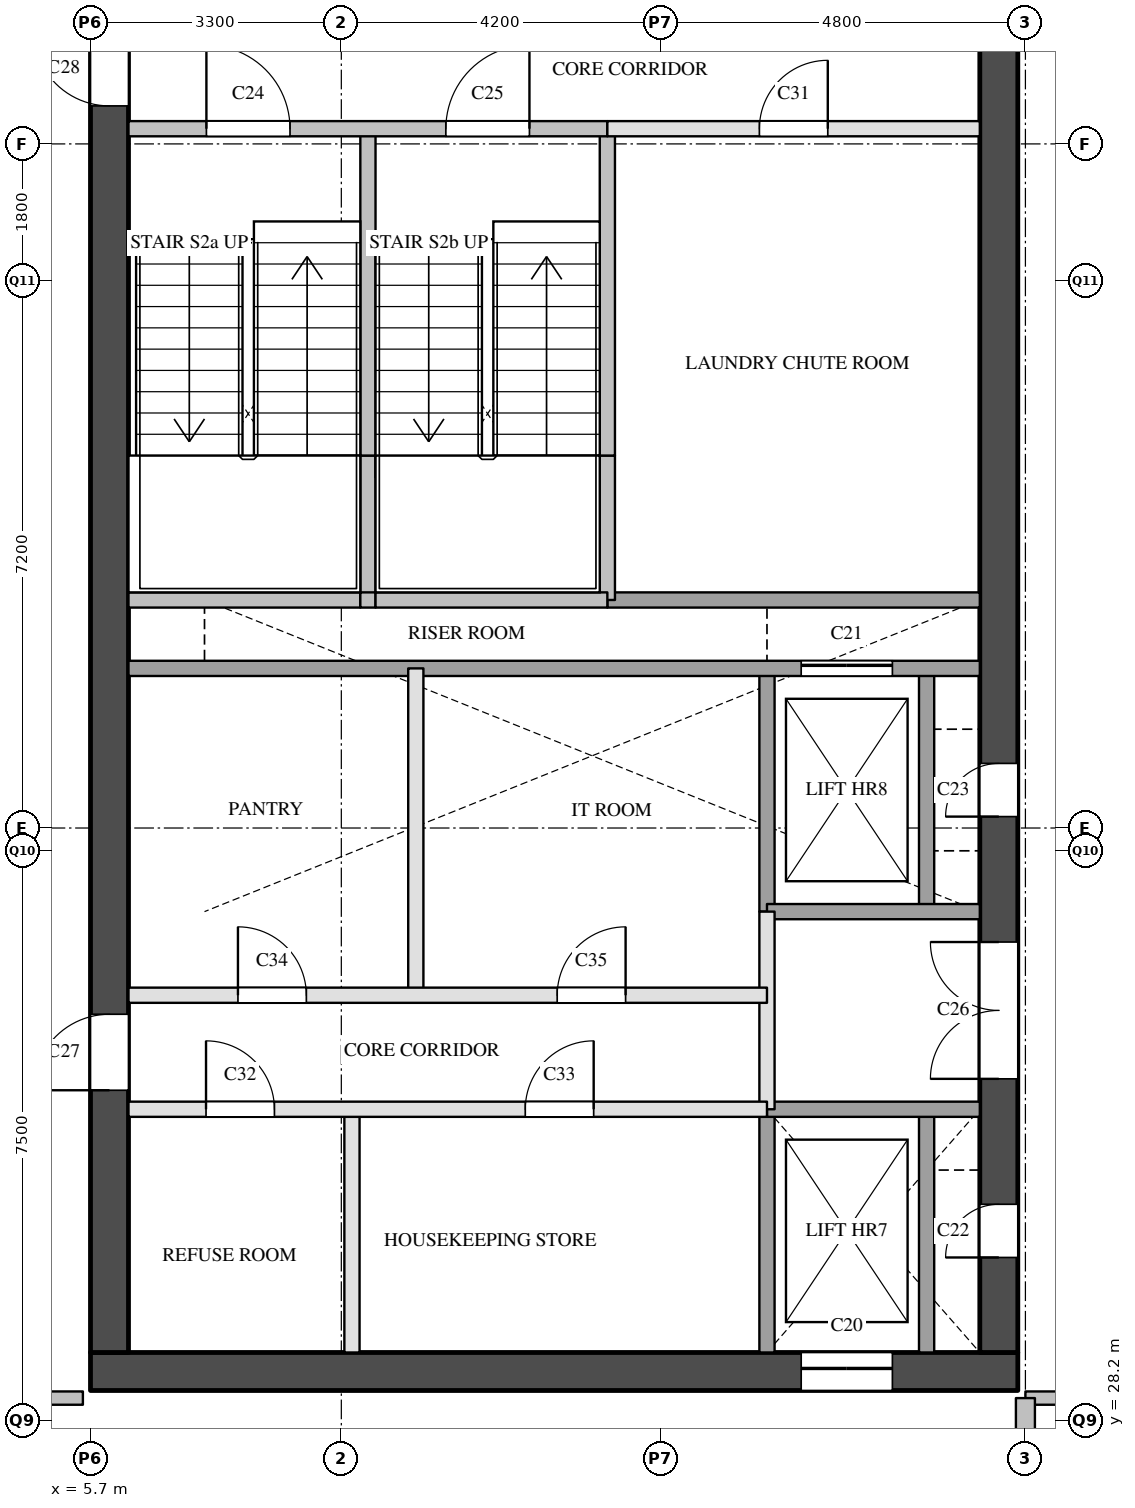
"""IFC4 building model, lengths in metres.
Left out: names, types, materials, properties, quantities, classifications, styles, units other than length and angle.
Written with IfcOpenShell. Run it as: python <this file> out.ifc"""

import sys

from ifc_helpers import new_model, si_unit, direction, frame, frame_2d, origin, place, context, subcontext, project, spatial, rectangle, extrude, element, fill, save


model = new_model("IFC4")
c1 = context("Model", 3, precision=1e-05, world=origin(), true_north=direction((0.0, 1.0)))
c2 = subcontext(c1, "Body", "Model", "MODEL_VIEW")
j1 = project(units=[si_unit("LENGTHUNIT", "METRE"), si_unit("PLANEANGLEUNIT", "RADIAN")], contexts=[c1])
p1 = place(None, origin())
s1 = spatial("IfcSite", under=j1, at=p1, CompositionType="ELEMENT")
p2 = place(p1, origin())
s2 = spatial("IfcBuilding", under=s1, at=p2, CompositionType="ELEMENT")
p3 = place(p2, frame((0.0, 0.0, 185.6)))
s3 = spatial("IfcBuildingStorey", under=s2, at=p3, CompositionType="ELEMENT", Elevation=185.6)
p4 = place(p3, frame((5.7, 28.85, 0.0), z_axis=(0.0, 0.0, 1.0), x_axis=(1.0, 0.0, 0.0)))
e1 = element("IfcWall", 1, at=p4, inside=s3, PredefinedType="SHEAR", context=c2, shape_type="SweptSolid", body=[
    extrude(rectangle(XDim=12.2, YDim=0.5, at=frame_2d((6.1, 0.0))), origin(), (0.0, 0.0, 1.0), 3.6),
])
p5 = place(p4, frame((9.35, 0.0, 0.0)))
e2 = element("IfcOpeningElement", 2, at=p5, cuts=e1, PredefinedType="OPENING", context=c2, shape_type="SweptSolid", body=[
    extrude(rectangle(XDim=1.2, YDim=2.1, at=frame_2d((0.6, 1.05))), frame((0.0, 0.26, 0.0), z_axis=(0.0, -1.0, 0.0), x_axis=(1.0, 0.0, 0.0)), (0.0, 0.0, 1.0), 0.52),
])
p6 = place(p3, frame((5.95, 29.1, 0.0), z_axis=(0.0, 0.0, 1.0), x_axis=(0.0, 1.0, 0.0)))
e3 = element("IfcWall", 3, at=p6, inside=s3, PredefinedType="SHEAR", context=c2, shape_type="SweptSolid", body=[
    extrude(rectangle(XDim=20.3, YDim=0.5, at=frame_2d((10.15, 0.0))), origin(), (0.0, 0.0, 1.0), 3.6),
])
p7 = place(p6, frame((3.45, 0.0, 0.0)))
e4 = element("IfcOpeningElement", 4, at=p7, cuts=e3, PredefinedType="OPENING", context=c2, shape_type="SweptSolid", body=[
    extrude(rectangle(XDim=1.0, YDim=2.1, at=frame_2d((0.5, 1.05))), frame((0.0, 0.26, 0.0), z_axis=(0.0, -1.0, 0.0), x_axis=(1.0, 0.0, 0.0)), (0.0, 0.0, 1.0), 0.52),
])
p8 = place(p6, frame((16.4, 0.0, 0.0)))
e5 = element("IfcOpeningElement", 5, at=p8, cuts=e3, PredefinedType="OPENING", context=c2, shape_type="SweptSolid", body=[
    extrude(rectangle(XDim=1.0, YDim=2.1, at=frame_2d((0.5, 1.05))), frame((0.0, 0.26, 0.0), z_axis=(0.0, -1.0, 0.0), x_axis=(1.0, 0.0, 0.0)), (0.0, 0.0, 1.0), 0.52),
])
p9 = place(p3, frame((17.65, 29.1, 0.0), z_axis=(0.0, 0.0, 1.0), x_axis=(0.0, 1.0, 0.0)))
e6 = element("IfcWall", 6, at=p9, inside=s3, PredefinedType="SHEAR", context=c2, shape_type="SweptSolid", body=[
    extrude(rectangle(XDim=20.3, YDim=0.5, at=frame_2d((10.15, 0.0))), origin(), (0.0, 0.0, 1.0), 3.6),
])
p10 = place(p9, frame((1.25, 0.0, 0.0)))
e7 = element("IfcOpeningElement", 7, at=p10, cuts=e6, PredefinedType="OPENING", context=c2, shape_type="SweptSolid", body=[
    extrude(rectangle(XDim=0.7, YDim=2.1, at=frame_2d((0.35, 1.05))), frame((0.0, 0.26, 0.0), z_axis=(0.0, -1.0, 0.0), x_axis=(1.0, 0.0, 0.0)), (0.0, 0.0, 1.0), 0.52),
])
p11 = place(p9, frame((7.05, 0.0, 0.0)))
e8 = element("IfcOpeningElement", 8, at=p11, cuts=e6, PredefinedType="OPENING", context=c2, shape_type="SweptSolid", body=[
    extrude(rectangle(XDim=0.7, YDim=2.1, at=frame_2d((0.35, 1.05))), frame((0.0, 0.26, 0.0), z_axis=(0.0, -1.0, 0.0), x_axis=(1.0, 0.0, 0.0)), (0.0, 0.0, 1.0), 0.52),
])
p12 = place(p9, frame((3.6, 0.0, 0.0)))
e9 = element("IfcOpeningElement", 9, at=p12, cuts=e6, PredefinedType="OPENING", context=c2, shape_type="SweptSolid", body=[
    extrude(rectangle(XDim=1.8, YDim=2.1, at=frame_2d((0.9, 1.05))), frame((0.0, 0.26, 0.0), z_axis=(0.0, -1.0, 0.0), x_axis=(1.0, 0.0, 0.0)), (0.0, 0.0, 1.0), 0.52),
])
p13 = place(p3, frame((9.14, 29.1, 0.0), z_axis=(0.0, 0.0, 1.0), x_axis=(0.0, 1.0, 0.0)))
e10 = element("IfcWall", 10, at=p13, inside=s3, PredefinedType="PARTITIONING", context=c2, shape_type="SweptSolid", body=[
    extrude(rectangle(XDim=3.2, YDim=0.2, at=frame_2d((1.6, 0.0))), origin(), (0.0, 0.0, 1.0), 3.6),
])
p14 = place(p3, frame((9.35, 39.0, 0.0), z_axis=(0.0, 0.0, 1.0), x_axis=(0.0, 1.0, 0.0)))
e11 = element("IfcWall", 11, at=p14, inside=s3, PredefinedType="SOLIDWALL", context=c2, shape_type="SweptSolid", body=[
    extrude(rectangle(XDim=1.9, YDim=0.2, at=frame_2d((0.95, 0.0))), origin(), (0.0, 0.0, 1.0), 3.6),
])
p15 = place(p3, frame((9.35, 40.9, 0.0), z_axis=(0.0, 0.0, 1.0), x_axis=(0.0, 1.0, 0.0)))
e12 = element("IfcWall", 12, at=p15, inside=s3, PredefinedType="SOLIDWALL", context=c2, shape_type="SweptSolid", body=[
    extrude(rectangle(XDim=4.3, YDim=0.2, at=frame_2d((2.15, 0.0))), origin(), (0.0, 0.0, 1.0), 3.6),
])
p16 = place(p3, frame((9.98, 33.8, 0.0), z_axis=(0.0, 0.0, 1.0), x_axis=(0.0, 1.0, 0.0)))
e13 = element("IfcWall", 13, at=p16, inside=s3, PredefinedType="PARTITIONING", context=c2, shape_type="SweptSolid", body=[
    extrude(rectangle(XDim=4.3, YDim=0.2, at=frame_2d((2.15, 0.0))), origin(), (0.0, 0.0, 1.0), 3.6),
])
p17 = place(p3, frame((12.5, 39.0, 0.0), z_axis=(0.0, 0.0, 1.0), x_axis=(0.0, 1.0, 0.0)))
e14 = element("IfcWall", 14, at=p17, inside=s3, PredefinedType="SOLIDWALL", context=c2, shape_type="SweptSolid", body=[
    extrude(rectangle(XDim=1.9, YDim=0.2, at=frame_2d((0.95, 0.0))), origin(), (0.0, 0.0, 1.0), 3.6),
])
p18 = place(p3, frame((12.5, 40.9, 0.0), z_axis=(0.0, 0.0, 1.0), x_axis=(0.0, 1.0, 0.0)))
e15 = element("IfcWall", 15, at=p18, inside=s3, PredefinedType="SOLIDWALL", context=c2, shape_type="SweptSolid", body=[
    extrude(rectangle(XDim=4.3, YDim=0.2, at=frame_2d((2.15, 0.0))), origin(), (0.0, 0.0, 1.0), 3.6),
])
p19 = place(p3, frame((14.6, 32.3, 0.0), z_axis=(0.0, 0.0, 1.0), x_axis=(0.0, 1.0, 0.0)))
e16 = element("IfcWall", 16, at=p19, inside=s3, PredefinedType="PARTITIONING", context=c2, shape_type="SweptSolid", body=[
    extrude(rectangle(XDim=2.6, YDim=0.2, at=frame_2d((1.3, 0.0))), origin(), (0.0, 0.0, 1.0), 3.6),
])
p20 = place(p3, frame((14.6, 29.1, 0.0), z_axis=(0.0, 0.0, 1.0), x_axis=(0.0, 1.0, 0.0)))
e17 = element("IfcWall", 17, at=p20, inside=s3, PredefinedType="SOLIDWALL", context=c2, shape_type="SweptSolid", body=[
    extrude(rectangle(XDim=3.2, YDim=0.2, at=frame_2d((1.6, 0.0))), origin(), (0.0, 0.0, 1.0), 3.6),
])
p21 = place(p3, frame((14.6, 34.9, 0.0), z_axis=(0.0, 0.0, 1.0), x_axis=(0.0, 1.0, 0.0)))
e18 = element("IfcWall", 18, at=p21, inside=s3, PredefinedType="SOLIDWALL", context=c2, shape_type="SweptSolid", body=[
    extrude(rectangle(XDim=3.2, YDim=0.2, at=frame_2d((1.6, 0.0))), origin(), (0.0, 0.0, 1.0), 3.6),
])
p22 = place(p3, frame((16.7, 29.1, 0.0), z_axis=(0.0, 0.0, 1.0), x_axis=(0.0, 1.0, 0.0)))
e19 = element("IfcWall", 19, at=p22, inside=s3, PredefinedType="SOLIDWALL", context=c2, shape_type="SweptSolid", body=[
    extrude(rectangle(XDim=3.2, YDim=0.2, at=frame_2d((1.6, 0.0))), origin(), (0.0, 0.0, 1.0), 3.6),
])
p23 = place(p3, frame((16.7, 34.9, 0.0), z_axis=(0.0, 0.0, 1.0), x_axis=(0.0, 1.0, 0.0)))
e20 = element("IfcWall", 20, at=p23, inside=s3, PredefinedType="SOLIDWALL", context=c2, shape_type="SweptSolid", body=[
    extrude(rectangle(XDim=3.2, YDim=0.2, at=frame_2d((1.6, 0.0))), origin(), (0.0, 0.0, 1.0), 3.6),
])
p24 = place(p3, frame((6.2, 32.3, 0.0), z_axis=(0.0, 0.0, 1.0), x_axis=(1.0, 0.0, 0.0)))
e21 = element("IfcWall", 21, at=p24, inside=s3, PredefinedType="PARTITIONING", context=c2, shape_type="SweptSolid", body=[
    extrude(rectangle(XDim=8.4, YDim=0.2, at=frame_2d((4.2, 0.0))), origin(), (0.0, 0.0, 1.0), 3.6),
])
p25 = place(p24, frame((1.02, 0.0, 0.0)))
e22 = element("IfcOpeningElement", 22, at=p25, cuts=e21, PredefinedType="OPENING", context=c2, shape_type="SweptSolid", body=[
    extrude(rectangle(XDim=0.9, YDim=2.1, at=frame_2d((0.45, 1.05))), frame((0.0, 0.11, 0.0), z_axis=(0.0, -1.0, 0.0), x_axis=(1.0, 0.0, 0.0)), (0.0, 0.0, 1.0), 0.22),
])
p26 = place(p24, frame((5.22, 0.0, 0.0)))
e23 = element("IfcOpeningElement", 23, at=p26, cuts=e21, PredefinedType="OPENING", context=c2, shape_type="SweptSolid", body=[
    extrude(rectangle(XDim=0.9, YDim=2.1, at=frame_2d((0.45, 1.05))), frame((0.0, 0.11, 0.0), z_axis=(0.0, -1.0, 0.0), x_axis=(1.0, 0.0, 0.0)), (0.0, 0.0, 1.0), 0.22),
])
p27 = place(p3, frame((14.6, 32.3, 0.0), z_axis=(0.0, 0.0, 1.0), x_axis=(1.0, 0.0, 0.0)))
e24 = element("IfcWall", 24, at=p27, inside=s3, PredefinedType="SOLIDWALL", context=c2, shape_type="SweptSolid", body=[
    extrude(rectangle(XDim=2.8, YDim=0.2, at=frame_2d((1.4, 0.0))), origin(), (0.0, 0.0, 1.0), 3.6),
])
p28 = place(p3, frame((6.2, 33.8, 0.0), z_axis=(0.0, 0.0, 1.0), x_axis=(1.0, 0.0, 0.0)))
e25 = element("IfcWall", 25, at=p28, inside=s3, PredefinedType="PARTITIONING", context=c2, shape_type="SweptSolid", body=[
    extrude(rectangle(XDim=8.4, YDim=0.2, at=frame_2d((4.2, 0.0))), origin(), (0.0, 0.0, 1.0), 3.6),
])
p29 = place(p28, frame((1.44, 0.0, 0.0)))
e26 = element("IfcOpeningElement", 26, at=p29, cuts=e25, PredefinedType="OPENING", context=c2, shape_type="SweptSolid", body=[
    extrude(rectangle(XDim=0.9, YDim=2.1, at=frame_2d((0.45, 1.05))), frame((0.0, 0.11, 0.0), z_axis=(0.0, -1.0, 0.0), x_axis=(1.0, 0.0, 0.0)), (0.0, 0.0, 1.0), 0.22),
])
p30 = place(p28, frame((5.64, 0.0, 0.0)))
e27 = element("IfcOpeningElement", 27, at=p30, cuts=e25, PredefinedType="OPENING", context=c2, shape_type="SweptSolid", body=[
    extrude(rectangle(XDim=0.9, YDim=2.1, at=frame_2d((0.45, 1.05))), frame((0.0, 0.11, 0.0), z_axis=(0.0, -1.0, 0.0), x_axis=(1.0, 0.0, 0.0)), (0.0, 0.0, 1.0), 0.22),
])
p31 = place(p3, frame((14.6, 34.9, 0.0), z_axis=(0.0, 0.0, 1.0), x_axis=(1.0, 0.0, 0.0)))
e28 = element("IfcWall", 28, at=p31, inside=s3, PredefinedType="SOLIDWALL", context=c2, shape_type="SweptSolid", body=[
    extrude(rectangle(XDim=2.8, YDim=0.2, at=frame_2d((1.4, 0.0))), origin(), (0.0, 0.0, 1.0), 3.6),
])
p32 = place(p3, frame((6.2, 38.1, 0.0), z_axis=(0.0, 0.0, 1.0), x_axis=(1.0, 0.0, 0.0)))
e29 = element("IfcWall", 29, at=p32, inside=s3, PredefinedType="SOLIDWALL", context=c2, shape_type="SweptSolid", body=[
    extrude(rectangle(XDim=11.2, YDim=0.2, at=frame_2d((5.6, 0.0))), origin(), (0.0, 0.0, 1.0), 3.6),
])
p33 = place(p32, frame((8.85, 0.0, 0.0)))
e30 = element("IfcOpeningElement", 30, at=p33, cuts=e29, PredefinedType="OPENING", context=c2, shape_type="SweptSolid", body=[
    extrude(rectangle(XDim=1.2, YDim=2.1, at=frame_2d((0.6, 1.05))), frame((0.0, 0.11, 0.0), z_axis=(0.0, -1.0, 0.0), x_axis=(1.0, 0.0, 0.0)), (0.0, 0.0, 1.0), 0.22),
])
p34 = place(p3, frame((12.5, 39.0, 0.0), z_axis=(0.0, 0.0, 1.0), x_axis=(1.0, 0.0, 0.0)))
e31 = element("IfcWall", 31, at=p34, inside=s3, PredefinedType="SOLIDWALL", context=c2, shape_type="SweptSolid", body=[
    extrude(rectangle(XDim=4.9, YDim=0.2, at=frame_2d((2.45, 0.0))), origin(), (0.0, 0.0, 1.0), 3.6),
])
p35 = place(p3, frame((6.2, 39.0, 0.0), z_axis=(0.0, 0.0, 1.0), x_axis=(1.0, 0.0, 0.0)))
e32 = element("IfcWall", 32, at=p35, inside=s3, PredefinedType="SOLIDWALL", context=c2, shape_type="SweptSolid", body=[
    extrude(rectangle(XDim=3.05, YDim=0.2, at=frame_2d((1.525, 0.0))), origin(), (0.0, 0.0, 1.0), 3.6),
])
p36 = place(p3, frame((9.25, 39.0, 0.0), z_axis=(0.0, 0.0, 1.0), x_axis=(1.0, 0.0, 0.0)))
e33 = element("IfcWall", 33, at=p36, inside=s3, PredefinedType="SOLIDWALL", context=c2, shape_type="SweptSolid", body=[
    extrude(rectangle(XDim=0.2, YDim=0.2, at=frame_2d((0.1, 0.0))), origin(), (0.0, 0.0, 1.0), 3.6),
])
p37 = place(p3, frame((9.45, 39.0, 0.0), z_axis=(0.0, 0.0, 1.0), x_axis=(1.0, 0.0, 0.0)))
e34 = element("IfcWall", 34, at=p37, inside=s3, PredefinedType="SOLIDWALL", context=c2, shape_type="SweptSolid", body=[
    extrude(rectangle(XDim=3.05, YDim=0.2, at=frame_2d((1.525, 0.0))), origin(), (0.0, 0.0, 1.0), 3.6),
])
p38 = place(p3, frame((12.5, 45.2, 0.0), z_axis=(0.0, 0.0, 1.0), x_axis=(1.0, 0.0, 0.0)))
e35 = element("IfcWall", 35, at=p38, inside=s3, PredefinedType="PARTITIONING", context=c2, shape_type="SweptSolid", body=[
    extrude(rectangle(XDim=4.9, YDim=0.2, at=frame_2d((2.45, 0.0))), origin(), (0.0, 0.0, 1.0), 3.6),
])
p39 = place(p38, frame((2.0, 0.0, 0.0)))
e36 = element("IfcOpeningElement", 36, at=p39, cuts=e35, PredefinedType="OPENING", context=c2, shape_type="SweptSolid", body=[
    extrude(rectangle(XDim=0.9, YDim=2.1, at=frame_2d((0.45, 1.05))), frame((0.0, 0.11, 0.0), z_axis=(0.0, -1.0, 0.0), x_axis=(1.0, 0.0, 0.0)), (0.0, 0.0, 1.0), 0.22),
])
p40 = place(p3, frame((6.2, 45.2, 0.0), z_axis=(0.0, 0.0, 1.0), x_axis=(1.0, 0.0, 0.0)))
e37 = element("IfcWall", 37, at=p40, inside=s3, PredefinedType="SOLIDWALL", context=c2, shape_type="SweptSolid", body=[
    extrude(rectangle(XDim=6.3, YDim=0.2, at=frame_2d((3.15, 0.0))), origin(), (0.0, 0.0, 1.0), 3.6),
])
p41 = place(p40, frame((1.025, 0.0, 0.0)))
e38 = element("IfcOpeningElement", 38, at=p41, cuts=e37, PredefinedType="OPENING", context=c2, shape_type="SweptSolid", body=[
    extrude(rectangle(XDim=1.1, YDim=2.1, at=frame_2d((0.55, 1.05))), frame((0.0, 0.11, 0.0), z_axis=(0.0, -1.0, 0.0), x_axis=(1.0, 0.0, 0.0)), (0.0, 0.0, 1.0), 0.22),
])
p42 = place(p40, frame((4.175, 0.0, 0.0)))
e39 = element("IfcOpeningElement", 39, at=p42, cuts=e37, PredefinedType="OPENING", context=c2, shape_type="SweptSolid", body=[
    extrude(rectangle(XDim=1.1, YDim=2.1, at=frame_2d((0.55, 1.05))), frame((0.0, 0.11, 0.0), z_axis=(0.0, -1.0, 0.0), x_axis=(1.0, 0.0, 0.0)), (0.0, 0.0, 1.0), 0.22),
])
for number, where, z_axis, x_axis in (
    (40, (3.8, 28.5, 0.0), (0.0, 0.0, 1.0), (1.0, 0.0, 0.0)),
    (41, (18.0, 28.5, 0.0), (0.0, 0.0, 1.0), (1.0, 0.0, 0.0)),
):
    element("IfcWall", number, at=place(p3, frame(where, z_axis=z_axis, x_axis=x_axis)), inside=s3, PredefinedType="PARTITIONING", context=c2, shape_type="SweptSolid", body=[
        extrude(rectangle(XDim=1.8, YDim=0.175, at=frame_2d((0.9, 0.0))), origin(), (0.0, 0.0, 1.0), 3.6),
    ])
p43 = place(p3, frame((18.0, 27.0, 0.0), z_axis=(0.0, 0.0, 1.0), x_axis=(0.0, 1.0, 0.0)))
e42 = element("IfcWall", 42, at=p43, inside=s3, PredefinedType="PARTITIONING", context=c2, shape_type="SweptSolid", body=[
    extrude(rectangle(XDim=1.5, YDim=0.25, at=frame_2d((0.75, 0.0))), origin(), (0.0, 0.0, 1.0), 3.6),
])
p44 = place(p5, origin())
e43 = element("IfcDoor", 43, at=p44, inside=s3, OperationType="SLIDING_TO_LEFT", PredefinedType="DOOR", context=c2, shape_type="SweptSolid", body=[
    extrude(rectangle(XDim=1.2, YDim=2.1, at=frame_2d((0.6, 1.05))), frame((0.0, 0.025, 0.0), z_axis=(0.0, -1.0, 0.0), x_axis=(1.0, 0.0, 0.0)), (0.0, 0.0, 1.0), 0.05),
])
fill(e2, e43)
p45 = place(p33, origin())
e44 = element("IfcDoor", 44, at=p45, inside=s3, OperationType="SLIDING_TO_LEFT", PredefinedType="DOOR", context=c2, shape_type="SweptSolid", body=[
    extrude(rectangle(XDim=1.2, YDim=2.1, at=frame_2d((0.6, 1.05))), frame((0.0, 0.025, 0.0), z_axis=(0.0, -1.0, 0.0), x_axis=(1.0, 0.0, 0.0)), (0.0, 0.0, 1.0), 0.05),
])
fill(e30, e44)
p46 = place(p10, origin())
e45 = element("IfcDoor", 45, at=p46, inside=s3, OperationType="SINGLE_SWING_LEFT", PredefinedType="DOOR", context=c2, shape_type="SweptSolid", body=[
    extrude(rectangle(XDim=0.7, YDim=2.1, at=frame_2d((0.35, 1.05))), frame((0.0, 0.025, 0.0), z_axis=(0.0, -1.0, 0.0), x_axis=(1.0, 0.0, 0.0)), (0.0, 0.0, 1.0), 0.05),
])
fill(e7, e45)
p47 = place(p11, origin())
e46 = element("IfcDoor", 46, at=p47, inside=s3, OperationType="SINGLE_SWING_LEFT", PredefinedType="DOOR", context=c2, shape_type="SweptSolid", body=[
    extrude(rectangle(XDim=0.7, YDim=2.1, at=frame_2d((0.35, 1.05))), frame((0.0, 0.025, 0.0), z_axis=(0.0, -1.0, 0.0), x_axis=(1.0, 0.0, 0.0)), (0.0, 0.0, 1.0), 0.05),
])
fill(e8, e46)
p48 = place(p41, origin())
e47 = element("IfcDoor", 47, at=p48, inside=s3, OperationType="SINGLE_SWING_LEFT", PredefinedType="DOOR", context=c2, shape_type="SweptSolid", body=[
    extrude(rectangle(XDim=1.1, YDim=2.1, at=frame_2d((0.55, 1.05))), frame((0.0, 0.025, 0.0), z_axis=(0.0, -1.0, 0.0), x_axis=(1.0, 0.0, 0.0)), (0.0, 0.0, 1.0), 0.05),
])
fill(e38, e47)
p49 = place(p42, origin())
e48 = element("IfcDoor", 48, at=p49, inside=s3, OperationType="SINGLE_SWING_RIGHT", PredefinedType="DOOR", context=c2, shape_type="SweptSolid", body=[
    extrude(rectangle(XDim=1.1, YDim=2.1, at=frame_2d((0.55, 1.05))), frame((0.0, 0.025, 0.0), z_axis=(0.0, -1.0, 0.0), x_axis=(1.0, 0.0, 0.0)), (0.0, 0.0, 1.0), 0.05),
])
fill(e39, e48)
p50 = place(p12, origin())
e49 = element("IfcDoor", 49, at=p50, inside=s3, OperationType="DOUBLE_DOOR_SINGLE_SWING", PredefinedType="DOOR", context=c2, shape_type="SweptSolid", body=[
    extrude(rectangle(XDim=1.8, YDim=2.1, at=frame_2d((0.9, 1.05))), frame((0.0, 0.025, 0.0), z_axis=(0.0, -1.0, 0.0), x_axis=(1.0, 0.0, 0.0)), (0.0, 0.0, 1.0), 0.05),
])
fill(e9, e49)
p51 = place(p7, origin())
e50 = element("IfcDoor", 50, at=p51, inside=s3, OperationType="SINGLE_SWING_LEFT", PredefinedType="DOOR", context=c2, shape_type="SweptSolid", body=[
    extrude(rectangle(XDim=1.0, YDim=2.1, at=frame_2d((0.5, 1.05))), frame((0.0, 0.025, 0.0), z_axis=(0.0, -1.0, 0.0), x_axis=(1.0, 0.0, 0.0)), (0.0, 0.0, 1.0), 0.05),
])
fill(e4, e50)
p52 = place(p8, origin())
e51 = element("IfcDoor", 51, at=p52, inside=s3, OperationType="SINGLE_SWING_RIGHT", PredefinedType="DOOR", context=c2, shape_type="SweptSolid", body=[
    extrude(rectangle(XDim=1.0, YDim=2.1, at=frame_2d((0.5, 1.05))), frame((0.0, 0.025, 0.0), z_axis=(0.0, -1.0, 0.0), x_axis=(1.0, 0.0, 0.0)), (0.0, 0.0, 1.0), 0.05),
])
fill(e5, e51)
p53 = place(p39, origin())
e52 = element("IfcDoor", 52, at=p53, inside=s3, OperationType="SINGLE_SWING_RIGHT", PredefinedType="DOOR", context=c2, shape_type="SweptSolid", body=[
    extrude(rectangle(XDim=0.9, YDim=2.1, at=frame_2d((0.45, 1.05))), frame((0.0, 0.025, 0.0), z_axis=(0.0, -1.0, 0.0), x_axis=(1.0, 0.0, 0.0)), (0.0, 0.0, 1.0), 0.05),
])
fill(e36, e52)
p54 = place(p25, origin())
e53 = element("IfcDoor", 53, at=p54, inside=s3, OperationType="SINGLE_SWING_LEFT", PredefinedType="DOOR", context=c2, shape_type="SweptSolid", body=[
    extrude(rectangle(XDim=0.9, YDim=2.1, at=frame_2d((0.45, 1.05))), frame((0.0, 0.025, 0.0), z_axis=(0.0, -1.0, 0.0), x_axis=(1.0, 0.0, 0.0)), (0.0, 0.0, 1.0), 0.05),
])
fill(e22, e53)
p55 = place(p26, origin())
e54 = element("IfcDoor", 54, at=p55, inside=s3, OperationType="SINGLE_SWING_RIGHT", PredefinedType="DOOR", context=c2, shape_type="SweptSolid", body=[
    extrude(rectangle(XDim=0.9, YDim=2.1, at=frame_2d((0.45, 1.05))), frame((0.0, 0.025, 0.0), z_axis=(0.0, -1.0, 0.0), x_axis=(1.0, 0.0, 0.0)), (0.0, 0.0, 1.0), 0.05),
])
fill(e23, e54)
p56 = place(p29, origin())
e55 = element("IfcDoor", 55, at=p56, inside=s3, OperationType="SINGLE_SWING_LEFT", PredefinedType="DOOR", context=c2, shape_type="SweptSolid", body=[
    extrude(rectangle(XDim=0.9, YDim=2.1, at=frame_2d((0.45, 1.05))), frame((0.0, 0.025, 0.0), z_axis=(0.0, -1.0, 0.0), x_axis=(1.0, 0.0, 0.0)), (0.0, 0.0, 1.0), 0.05),
])
fill(e26, e55)
p57 = place(p30, origin())
e56 = element("IfcDoor", 56, at=p57, inside=s3, OperationType="SINGLE_SWING_RIGHT", PredefinedType="DOOR", context=c2, shape_type="SweptSolid", body=[
    extrude(rectangle(XDim=0.9, YDim=2.1, at=frame_2d((0.45, 1.05))), frame((0.0, 0.025, 0.0), z_axis=(0.0, -1.0, 0.0), x_axis=(1.0, 0.0, 0.0)), (0.0, 0.0, 1.0), 0.05),
])
fill(e27, e56)
save(model, sys.argv[1])
